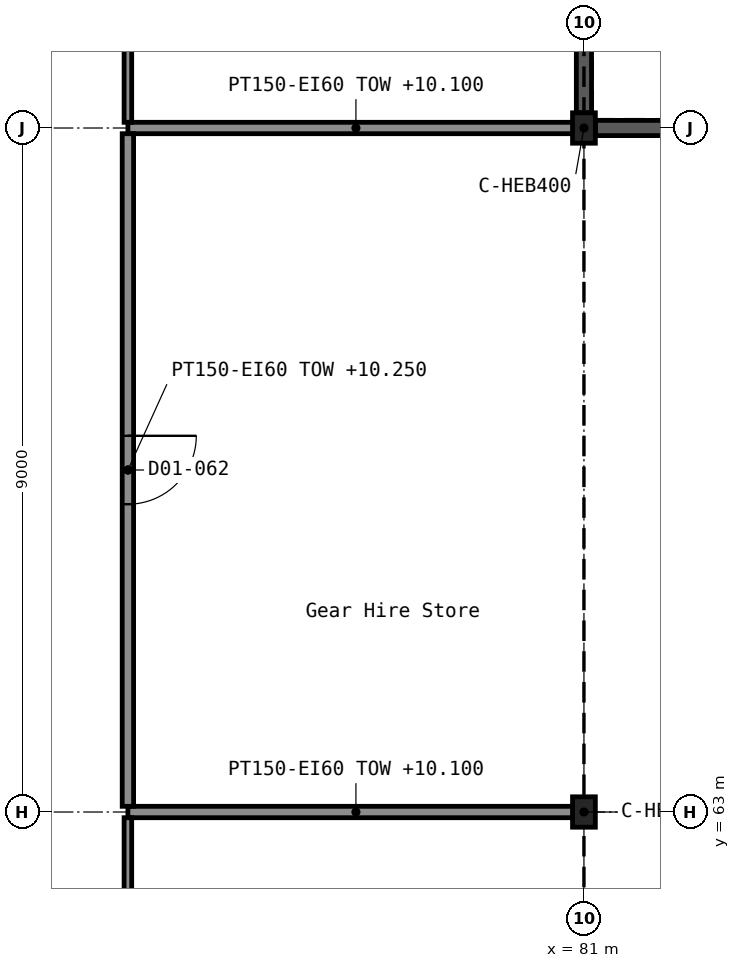
"""IFC4 building model, lengths in metres.
Left out: names, types, materials, properties, quantities, classifications, styles, units other than length and angle.
Written with IfcOpenShell. Run it as: python <this file> out.ifc"""

import sys

from ifc_helpers import new_model, si_unit, direction, frame, frame_2d, origin, origin_2d, place, context, subcontext, project, spatial, rectangle, i_section, extrude, element, fill, save


model = new_model("IFC4")
c1 = context("Model", 3, precision=1e-05, world=origin(), true_north=direction((0.0, 1.0)))
c2 = subcontext(c1, "Body", "Model", "MODEL_VIEW")
j1 = project(units=[si_unit("LENGTHUNIT", "METRE"), si_unit("PLANEANGLEUNIT", "RADIAN")], contexts=[c1])
p1 = place(None, origin())
s1 = spatial("IfcSite", under=j1, at=p1, CompositionType="ELEMENT")
p2 = place(p1, origin())
s2 = spatial("IfcBuilding", under=s1, at=p2, CompositionType="ELEMENT")
p3 = place(p2, frame((0.0, 0.0, 5.4)))
s3 = spatial("IfcBuildingStorey", under=s2, at=p3, CompositionType="ELEMENT", Elevation=5.4)
for number, where, z_axis, x_axis in (
    (1, (81.0, 63.0, 0.0), (0.0, 0.0, 1.0), (1.0, 0.0, 0.0)),
    (2, (81.0, 72.0, 0.0), (0.0, 0.0, 1.0), (1.0, 0.0, 0.0)),
):
    element("IfcColumn", number, at=place(p3, frame(where, z_axis=z_axis, x_axis=x_axis)), inside=s3, PredefinedType="COLUMN", context=c2, shape_type="SweptSolid", body=[
        extrude(i_section(OverallWidth=0.3, OverallDepth=0.4, WebThickness=0.013, FlangeThickness=0.024, FilletRadius=0.027, at=origin_2d()), origin(), (0.0, 0.0, 1.0), 5.4),
    ])
p4 = place(p3, frame((81.15, 72.0, 0.0), z_axis=(0.0, 0.0, 1.0), x_axis=(1.0, 0.0, 0.0)))
e3 = element("IfcWall", 3, at=p4, inside=s3, PredefinedType="SHEAR", context=c2, shape_type="SweptSolid", body=[
    extrude(rectangle(XDim=8.7, YDim=0.2, at=frame_2d((4.35, 0.0))), origin(), (0.0, 0.0, 1.0), 5.4),
])
p5 = place(p3, frame((81.0, 72.2, 0.0), z_axis=(0.0, 0.0, 1.0), x_axis=(0.0, 1.0, 0.0)))
e4 = element("IfcWall", 4, at=p5, inside=s3, PredefinedType="SHEAR", context=c2, shape_type="SweptSolid", body=[
    extrude(rectangle(XDim=8.6, YDim=0.2, at=frame_2d((4.3, 0.0))), origin(), (0.0, 0.0, 1.0), 5.4),
])
for number, where, z_axis, x_axis in (
    (5, (75.0, 63.0, 0.0), (0.0, 0.0, 1.0), (1.0, 0.0, 0.0)),
    (6, (75.0, 72.0, 0.0), (0.0, 0.0, 1.0), (1.0, 0.0, 0.0)),
):
    element("IfcWall", number, at=place(p3, frame(where, z_axis=z_axis, x_axis=x_axis)), inside=s3, PredefinedType="PARTITIONING", context=c2, shape_type="SweptSolid", body=[
        extrude(rectangle(XDim=6.0, YDim=0.15, at=frame_2d((3.0, 0.0))), origin(), (0.0, 0.0, 1.0), 4.7),
    ])
p6 = place(p3, frame((75.0, 63.075, 0.0), z_axis=(0.0, 0.0, 1.0), x_axis=(0.0, 1.0, 0.0)))
e7 = element("IfcWall", 7, at=p6, inside=s3, PredefinedType="PARTITIONING", context=c2, shape_type="SweptSolid", body=[
    extrude(rectangle(XDim=8.85, YDim=0.15, at=frame_2d((4.425, 0.0))), origin(), (0.0, 0.0, 1.0), 4.85),
])
p7 = place(p6, frame((3.975, 0.0, 0.0)))
e8 = element("IfcOpeningElement", 8, at=p7, cuts=e7, PredefinedType="OPENING", context=c2, shape_type="SweptSolid", body=[
    extrude(rectangle(XDim=0.9, YDim=2.4, at=frame_2d((0.45, 1.2))), frame((0.0, 0.086, 0.0), z_axis=(0.0, -1.0, 0.0), x_axis=(1.0, 0.0, 0.0)), (0.0, 0.0, 1.0), 0.172),
])
p8 = place(p3, frame((75.0, 54.05, 0.0), z_axis=(0.0, 0.0, 1.0), x_axis=(0.0, 1.0, 0.0)))
e9 = element("IfcWall", 9, at=p8, inside=s3, PredefinedType="PARTITIONING", context=c2, shape_type="SweptSolid", body=[
    extrude(rectangle(XDim=8.875, YDim=0.1, at=frame_2d((4.438, 0.0))), origin(), (0.0, 0.0, 1.0), 4.85),
])
p9 = place(p8, frame((3.95, 0.0, 0.0)))
e10 = element("IfcOpeningElement", 10, at=p9, cuts=e9, PredefinedType="OPENING", context=c2, shape_type="SweptSolid", body=[
    extrude(rectangle(XDim=1.0, YDim=2.1, at=frame_2d((0.5, 1.05))), frame((0.0, 0.061, 0.0), z_axis=(0.0, -1.0, 0.0), x_axis=(1.0, 0.0, 0.0)), (0.0, 0.0, 1.0), 0.122),
])
p10 = place(p3, frame((75.0, 72.075, 0.0), z_axis=(0.0, 0.0, 1.0), x_axis=(0.0, 1.0, 0.0)))
e11 = element("IfcWall", 11, at=p10, inside=s3, PredefinedType="PARTITIONING", context=c2, shape_type="SweptSolid", body=[
    extrude(rectangle(XDim=8.875, YDim=0.1, at=frame_2d((4.438, 0.0))), origin(), (0.0, 0.0, 1.0), 4.85),
])
p11 = place(p10, frame((3.525, 0.0, 0.0)))
e12 = element("IfcOpeningElement", 12, at=p11, cuts=e11, PredefinedType="OPENING", context=c2, shape_type="SweptSolid", body=[
    extrude(rectangle(XDim=1.8, YDim=2.1, at=frame_2d((0.9, 1.05))), frame((0.0, 0.061, 0.0), z_axis=(0.0, -1.0, 0.0), x_axis=(1.0, 0.0, 0.0)), (0.0, 0.0, 1.0), 0.122),
])
p12 = place(p2, origin())
s4 = spatial("IfcBuildingStorey", under=s2, at=p12, CompositionType="ELEMENT", Elevation=0.0)
p13 = place(p12, frame((81.15, 54.1, 0.0), z_axis=(0.0, 0.0, 1.0), x_axis=(0.0, 1.0, 0.0)))
e13 = element("IfcWall", 13, at=p13, inside=s4, PredefinedType="SOLIDWALL", context=c2, shape_type="SweptSolid", body=[
    extrude(rectangle(XDim=17.8, YDim=0.3, at=frame_2d((8.9, 0.0))), origin(), (0.0, 0.0, 1.0), 16.0),
])
p14 = place(p7, frame((0.9, 0.0, 0.0), z_axis=(0.0, 0.0, 1.0), x_axis=(-1.0, 0.0, 0.0)))
e14 = element("IfcDoor", 14, at=p14, inside=s3, OperationType="SINGLE_SWING_LEFT", PredefinedType="DOOR", context=c2, shape_type="SweptSolid", body=[
    extrude(rectangle(XDim=0.9, YDim=2.4, at=frame_2d((0.45, 1.2))), frame((0.0, 0.025, 0.0), z_axis=(0.0, -1.0, 0.0), x_axis=(1.0, 0.0, 0.0)), (0.0, 0.0, 1.0), 0.05),
])
fill(e8, e14)
save(model, sys.argv[1])
